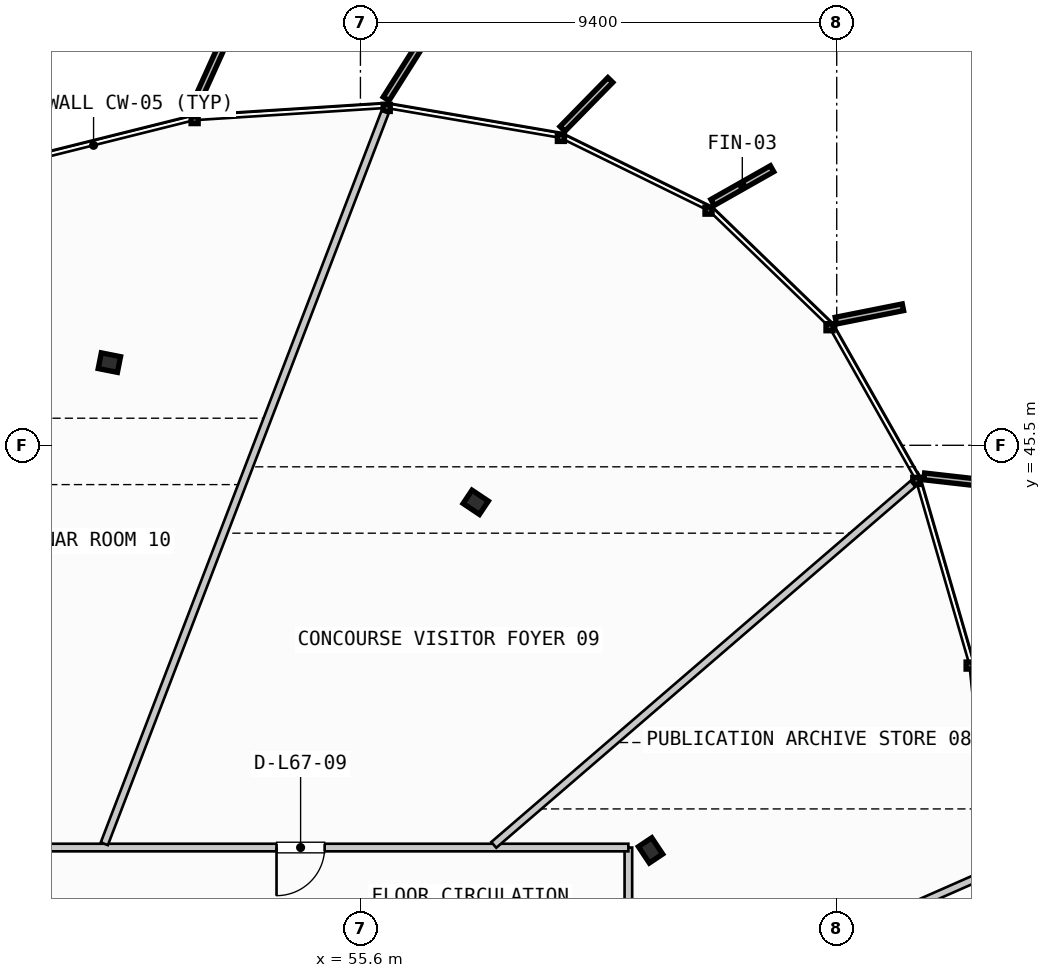
"""IFC4 building model, lengths in metres.
Left out: names, types, materials, properties, quantities, classifications, styles, units other than length and angle.
Written with IfcOpenShell. Run it as: python <this file> out.ifc"""

import sys

from ifc_helpers import new_model, si_unit, direction, frame, frame_2d, origin, origin_2d, place, context, subcontext, project, spatial, rectangle, i_section, extrude, source, transform, mapped, element, fill, save


model = new_model("IFC4")
c1 = context("Model", 3, precision=1e-05, world=origin(), true_north=direction((0.0, 1.0)))
c2 = subcontext(c1, "Body", "Model", "MODEL_VIEW")
j1 = project(units=[si_unit("LENGTHUNIT", "METRE"), si_unit("PLANEANGLEUNIT", "RADIAN")], contexts=[c1])
p1 = place(None, origin())
s1 = spatial("IfcSite", under=j1, at=p1, CompositionType="ELEMENT")
p2 = place(p1, origin())
s2 = spatial("IfcBuilding", under=s1, at=p2, CompositionType="ELEMENT")
p3 = place(p2, frame((0.0, 0.0, 256.0)))
s3 = spatial("IfcBuildingStorey", under=s2, at=p3, CompositionType="ELEMENT", Elevation=256.0)
m1 = source(origin(), c2, "Body", "SweptSolid", [
    extrude(i_section(OverallWidth=0.387, OverallDepth=0.316, WebThickness=0.019, FlangeThickness=0.028, FilletRadius=0.015, at=origin_2d()), origin(), (0.0, 0.0, 1.0), 3.21),
])
for number, where, z_axis, x_axis in (
    (1, (61.326, 37.506, 0.0), (0.0, 0.0, 1.0), (0.831, 0.556, 0.0)),
    (2, (57.875, 44.375, 0.0), (0.0, 0.0, 1.0), (0.556, 0.831, 0.0)),
    (3, (50.645, 47.132, 0.0), (0.0, 0.0, 1.0), (0.195, 0.981, 0.0)),
):
    element("IfcColumn", number, at=place(p3, frame(where, z_axis=z_axis, x_axis=x_axis)), inside=s3, PredefinedType="COLUMN", context=c2, shape_type="MappedRepresentation", body=[
        mapped(m1, transform((0.0, 0.0, 0.0), scale=1.0)),
    ])
p4 = place(p3, frame((60.888, 18.269, 0.0), z_axis=(0.0, 0.0, 1.0), x_axis=(0.0, 1.0, 0.0)))
e4 = element("IfcWall", 4, at=p4, inside=s3, PredefinedType="PARTITIONING", context=c2, shape_type="SweptSolid", body=[
    extrude(rectangle(XDim=19.293, YDim=0.15, at=frame_2d((9.646, 0.0))), origin(), (0.0, 0.0, 1.0), 2.28),
])
p5 = place(p4, frame((9.164, 0.0, 0.0)))
e5 = element("IfcOpeningElement", 5, at=p5, cuts=e4, PredefinedType="OPENING", context=c2, shape_type="SweptSolid", body=[
    extrude(rectangle(XDim=0.95, YDim=2.15, at=frame_2d((0.475, 1.075))), frame((0.0, 0.085, 0.0), z_axis=(0.0, -1.0, 0.0), x_axis=(1.0, 0.0, 0.0)), (0.0, 0.0, 1.0), 0.17),
])
p6 = place(p4, frame((16.715, 0.0, 0.0)))
e6 = element("IfcOpeningElement", 6, at=p6, cuts=e4, PredefinedType="OPENING", context=c2, shape_type="SweptSolid", body=[
    extrude(rectangle(XDim=0.95, YDim=2.15, at=frame_2d((0.475, 1.075))), frame((0.0, 0.085, 0.0), z_axis=(0.0, -1.0, 0.0), x_axis=(1.0, 0.0, 0.0)), (0.0, 0.0, 1.0), 0.17),
])
p7 = place(p3, frame((60.888, 37.562, 0.0), z_axis=(0.0, 0.0, 1.0), x_axis=(-1.0, 0.0, 0.0)))
e7 = element("IfcWall", 7, at=p7, inside=s3, PredefinedType="PARTITIONING", context=c2, shape_type="SweptSolid", body=[
    extrude(rectangle(XDim=28.038, YDim=0.15, at=frame_2d((14.019, 0.0))), origin(), (0.0, 0.0, 1.0), 2.28),
])
p8 = place(p7, frame((5.994, 0.0, 0.0)))
e8 = element("IfcOpeningElement", 8, at=p8, cuts=e7, PredefinedType="OPENING", context=c2, shape_type="SweptSolid", body=[
    extrude(rectangle(XDim=0.95, YDim=2.15, at=frame_2d((0.475, 1.075))), frame((0.0, 0.085, 0.0), z_axis=(0.0, -1.0, 0.0), x_axis=(1.0, 0.0, 0.0)), (0.0, 0.0, 1.0), 0.17),
])
p9 = place(p7, frame((12.306, 0.0, 0.0)))
e9 = element("IfcOpeningElement", 9, at=p9, cuts=e7, PredefinedType="OPENING", context=c2, shape_type="SweptSolid", body=[
    extrude(rectangle(XDim=0.95, YDim=2.15, at=frame_2d((0.475, 1.075))), frame((0.0, 0.085, 0.0), z_axis=(0.0, -1.0, 0.0), x_axis=(1.0, 0.0, 0.0)), (0.0, 0.0, 1.0), 0.17),
])
p10 = place(p7, frame((20.858, 0.0, 0.0)))
e10 = element("IfcOpeningElement", 10, at=p10, cuts=e7, PredefinedType="OPENING", context=c2, shape_type="SweptSolid", body=[
    extrude(rectangle(XDim=0.95, YDim=2.15, at=frame_2d((0.475, 1.075))), frame((0.0, 0.085, 0.0), z_axis=(0.0, -1.0, 0.0), x_axis=(1.0, 0.0, 0.0)), (0.0, 0.0, 1.0), 0.17),
])
p11 = place(p3, frame((60.961, 33.967, 0.0), z_axis=(0.0, 0.0, 1.0), x_axis=(0.915265056404, 0.402852177015, 0.0)))
e11 = element("IfcWall", 11, at=p11, inside=s3, PredefinedType="PARTITIONING", context=c2, shape_type="SweptSolid", body=[
    extrude(rectangle(XDim=7.636, YDim=0.15, at=frame_2d((3.818, 0.0))), origin(), (0.0, 0.0, 1.0), 2.28),
])
p12 = place(p3, frame((58.232, 37.614, 0.0), z_axis=(0.0, 0.0, 1.0), x_axis=(0.757629619608, 0.652684732081, 0.0)))
e12 = element("IfcWall", 12, at=p12, inside=s3, PredefinedType="PARTITIONING", context=c2, shape_type="SweptSolid", body=[
    extrude(rectangle(XDim=10.915, YDim=0.15, at=frame_2d((5.458, 0.0))), origin(), (0.0, 0.0, 1.0), 2.28),
])
p13 = place(p3, frame((50.546, 37.637, 0.0), z_axis=(0.0, 0.0, 1.0), x_axis=(0.35830718527, 0.933603749448, 0.0)))
e13 = element("IfcWall", 13, at=p13, inside=s3, PredefinedType="PARTITIONING", context=c2, shape_type="SweptSolid", body=[
    extrude(rectangle(XDim=15.464, YDim=0.15, at=frame_2d((7.732, 0.0))), origin(), (0.0, 0.0, 1.0), 2.28),
])
m2 = source(origin(), c2, "Body", "SweptSolid", [
    extrude(rectangle(XDim=0.95, YDim=2.15, at=frame_2d((0.475, 1.075))), frame((0.0, 0.025, 0.0), z_axis=(0.0, -1.0, 0.0), x_axis=(1.0, 0.0, 0.0)), (0.0, 0.0, 1.0), 0.05),
])
p14 = place(p8, origin())
e14 = element("IfcDoor", 14, at=p14, inside=s3, OperationType="SINGLE_SWING_RIGHT", PredefinedType="DOOR", context=c2, shape_type="MappedRepresentation", body=[
    mapped(m2, transform((0.0, 0.0, 0.0), scale=1.0)),
])
fill(e8, e14)
save(model, sys.argv[1])
